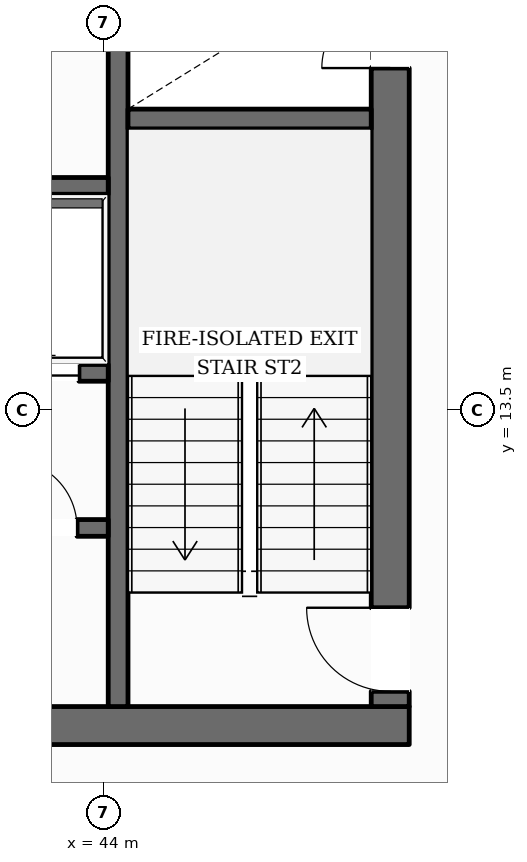
"""IFC4 building model, lengths in metres.
Left out: names, types, materials, properties, quantities, classifications, styles, units other than length and angle.
Written with IfcOpenShell. Run it as: python <this file> out.ifc"""

import sys

from ifc_helpers import new_model, si_unit, direction, frame, frame_2d, origin, place, context, subcontext, project, spatial, rectangle, extrude, element, fill, save


model = new_model("IFC4")
c1 = context("Model", 3, precision=1e-05, world=origin(), true_north=direction((0.0, 1.0)))
c2 = subcontext(c1, "Body", "Model", "MODEL_VIEW")
j1 = project(units=[si_unit("LENGTHUNIT", "METRE"), si_unit("PLANEANGLEUNIT", "RADIAN")], contexts=[c1])
p1 = place(None, origin())
s1 = spatial("IfcSite", under=j1, at=p1, CompositionType="ELEMENT")
p2 = place(p1, origin())
s2 = spatial("IfcBuilding", under=s1, at=p2, CompositionType="ELEMENT")
p3 = place(p2, frame((0.0, 0.0, 147.1)))
s3 = spatial("IfcBuildingStorey", under=s2, at=p3, CompositionType="ELEMENT", Elevation=147.1)
p4 = place(p3, frame((27.98, 9.35, 0.0), z_axis=(0.0, 0.0, 1.0), x_axis=(1.0, 0.0, 0.0)))
e1 = element("IfcWall", 1, at=p4, inside=s3, PredefinedType="SOLIDWALL", context=c2, shape_type="SweptSolid", body=[
    extrude(rectangle(XDim=20.04, YDim=0.5, at=frame_2d((10.02, 0.0))), origin(), (0.0, 0.0, 1.0), 3.6),
])
p5 = place(p4, frame((10.52, 0.0, 0.0)))
e2 = element("IfcOpeningElement", 2, at=p5, cuts=e1, PredefinedType="OPENING", context=c2, shape_type="SweptSolid", body=[
    extrude(rectangle(XDim=1.4, YDim=2.2, at=frame_2d((0.7, 1.1))), frame((0.0, 0.26, 0.0), z_axis=(0.0, -1.0, 0.0), x_axis=(1.0, 0.0, 0.0)), (0.0, 0.0, 1.0), 0.52),
])
p6 = place(p3, frame((47.77, 9.6, 0.0), z_axis=(0.0, 0.0, 1.0), x_axis=(0.0, 1.0, 0.0)))
e3 = element("IfcWall", 3, at=p6, inside=s3, PredefinedType="SOLIDWALL", context=c2, shape_type="SweptSolid", body=[
    extrude(rectangle(XDim=13.0, YDim=0.5, at=frame_2d((6.5, 0.0))), origin(), (0.0, 0.0, 1.0), 3.6),
])
p7 = place(p6, frame((0.2, 0.0, 0.0)))
e4 = element("IfcOpeningElement", 4, at=p7, cuts=e3, PredefinedType="OPENING", context=c2, shape_type="SweptSolid", body=[
    extrude(rectangle(XDim=1.1, YDim=2.15, at=frame_2d((0.55, 1.075))), frame((0.0, 0.26, 0.0), z_axis=(0.0, -1.0, 0.0), x_axis=(1.0, 0.0, 0.0)), (0.0, 0.0, 1.0), 0.52),
])
p8 = place(p6, frame((8.4, 0.0, 0.0)))
e5 = element("IfcOpeningElement", 5, at=p8, cuts=e3, PredefinedType="OPENING", context=c2, shape_type="SweptSolid", body=[
    extrude(rectangle(XDim=0.9, YDim=2.1, at=frame_2d((0.45, 1.05))), frame((0.0, 0.26, 0.0), z_axis=(0.0, -1.0, 0.0), x_axis=(1.0, 0.0, 0.0)), (0.0, 0.0, 1.0), 0.52),
])
p9 = place(p3, frame((44.19, 9.6, 0.0), z_axis=(0.0, 0.0, 1.0), x_axis=(0.0, 1.0, 0.0)))
e6 = element("IfcWall", 6, at=p9, inside=s3, PredefinedType="SHEAR", context=c2, shape_type="SweptSolid", body=[
    extrude(rectangle(XDim=13.0, YDim=0.26, at=frame_2d((6.5, 0.0))), origin(), (0.0, 0.0, 1.0), 3.6),
])
p10 = place(p9, frame((10.925, 0.0, 0.0)))
e7 = element("IfcOpeningElement", 7, at=p10, cuts=e6, PredefinedType="OPENING", context=c2, shape_type="SweptSolid", body=[
    extrude(rectangle(XDim=1.25, YDim=2.25, at=frame_2d((0.625, 1.125))), frame((0.0, 0.14, 0.0), z_axis=(0.0, -1.0, 0.0), x_axis=(1.0, 0.0, 0.0)), (0.0, 0.0, 1.0), 0.28),
])
p11 = place(p3, frame((44.32, 17.33, 0.0), z_axis=(0.0, 0.0, 1.0), x_axis=(1.0, 0.0, 0.0)))
e8 = element("IfcWall", 8, at=p11, inside=s3, PredefinedType="SHEAR", context=c2, shape_type="SweptSolid", body=[
    extrude(rectangle(XDim=3.2, YDim=0.26, at=frame_2d((1.6, 0.0))), origin(), (0.0, 0.0, 1.0), 3.6),
])
p12 = place(p3, frame((31.94, 16.45, 0.0), z_axis=(0.0, 0.0, 1.0), x_axis=(1.0, 0.0, 0.0)))
e9 = element("IfcWall", 9, at=p12, inside=s3, PredefinedType="SOLIDWALL", context=c2, shape_type="SweptSolid", body=[
    extrude(rectangle(XDim=12.12, YDim=0.22, at=frame_2d((6.06, 0.0))), origin(), (0.0, 0.0, 1.0), 3.6),
])
p13 = place(p3, frame((31.94, 13.99, 0.0), z_axis=(0.0, 0.0, 1.0), x_axis=(1.0, 0.0, 0.0)))
e10 = element("IfcWall", 10, at=p13, inside=s3, PredefinedType="SOLIDWALL", context=c2, shape_type="SweptSolid", body=[
    extrude(rectangle(XDim=12.12, YDim=0.22, at=frame_2d((6.06, 0.0))), origin(), (0.0, 0.0, 1.0), 3.6),
])
p14 = place(p13, frame((1.21, 0.0, 0.0)))
e11 = element("IfcOpeningElement", 11, at=p14, cuts=e10, PredefinedType="OPENING", context=c2, shape_type="SweptSolid", body=[
    extrude(rectangle(XDim=0.9, YDim=2.1, at=frame_2d((0.45, 1.05))), frame((0.0, 0.12, 0.0), z_axis=(0.0, -1.0, 0.0), x_axis=(1.0, 0.0, 0.0)), (0.0, 0.0, 1.0), 0.24),
])
p15 = place(p13, frame((4.31, 0.0, 0.0)))
e12 = element("IfcOpeningElement", 12, at=p15, cuts=e10, PredefinedType="OPENING", context=c2, shape_type="SweptSolid", body=[
    extrude(rectangle(XDim=0.9, YDim=2.1, at=frame_2d((0.45, 1.05))), frame((0.0, 0.12, 0.0), z_axis=(0.0, -1.0, 0.0), x_axis=(1.0, 0.0, 0.0)), (0.0, 0.0, 1.0), 0.24),
])
p16 = place(p13, frame((6.535, 0.0, 0.0)))
e13 = element("IfcOpeningElement", 13, at=p16, cuts=e10, PredefinedType="OPENING", context=c2, shape_type="SweptSolid", body=[
    extrude(rectangle(XDim=1.1, YDim=2.2, at=frame_2d((0.55, 1.1))), frame((0.0, 0.12, 0.0), z_axis=(0.0, -1.0, 0.0), x_axis=(1.0, 0.0, 0.0)), (0.0, 0.0, 1.0), 0.24),
])
p17 = place(p13, frame((8.585, 0.0, 0.0)))
e14 = element("IfcOpeningElement", 14, at=p17, cuts=e10, PredefinedType="OPENING", context=c2, shape_type="SweptSolid", body=[
    extrude(rectangle(XDim=1.1, YDim=2.2, at=frame_2d((0.55, 1.1))), frame((0.0, 0.12, 0.0), z_axis=(0.0, -1.0, 0.0), x_axis=(1.0, 0.0, 0.0)), (0.0, 0.0, 1.0), 0.24),
])
p18 = place(p13, frame((10.635, 0.0, 0.0)))
e15 = element("IfcOpeningElement", 15, at=p18, cuts=e10, PredefinedType="OPENING", context=c2, shape_type="SweptSolid", body=[
    extrude(rectangle(XDim=1.1, YDim=2.2, at=frame_2d((0.55, 1.1))), frame((0.0, 0.12, 0.0), z_axis=(0.0, -1.0, 0.0), x_axis=(1.0, 0.0, 0.0)), (0.0, 0.0, 1.0), 0.24),
])
p19 = place(p3, frame((40.28, 11.95, 0.0), z_axis=(0.0, 0.0, 1.0), x_axis=(1.0, 0.0, 0.0)))
e16 = element("IfcWall", 16, at=p19, inside=s3, PredefinedType="SOLIDWALL", context=c2, shape_type="SweptSolid", body=[
    extrude(rectangle(XDim=3.78, YDim=0.22, at=frame_2d((1.89, 0.0))), origin(), (0.0, 0.0, 1.0), 3.6),
])
p20 = place(p19, frame((0.62, 0.0, 0.0)))
e17 = element("IfcOpeningElement", 17, at=p20, cuts=e16, PredefinedType="OPENING", context=c2, shape_type="SweptSolid", body=[
    extrude(rectangle(XDim=0.9, YDim=2.1, at=frame_2d((0.45, 1.05))), frame((0.0, 0.12, 0.0), z_axis=(0.0, -1.0, 0.0), x_axis=(1.0, 0.0, 0.0)), (0.0, 0.0, 1.0), 0.24),
])
p21 = place(p19, frame((2.47, 0.0, 0.0)))
e18 = element("IfcOpeningElement", 18, at=p21, cuts=e16, PredefinedType="OPENING", context=c2, shape_type="SweptSolid", body=[
    extrude(rectangle(XDim=0.9, YDim=2.1, at=frame_2d((0.45, 1.05))), frame((0.0, 0.12, 0.0), z_axis=(0.0, -1.0, 0.0), x_axis=(1.0, 0.0, 0.0)), (0.0, 0.0, 1.0), 0.24),
])
p22 = place(p3, frame((43.264, 45.146, 0.0), z_axis=(0.0, 0.0, 1.0), x_axis=(0.496479799544, -0.868048275527, 0.0)))
e19 = element("IfcWall", 19, at=p22, inside=s3, PredefinedType="STANDARD", context=c2, shape_type="SweptSolid", body=[
    extrude(rectangle(XDim=37.869, YDim=0.38, at=frame_2d((18.934, 0.0))), origin(), (0.0, 0.0, 1.0), 3.059),
])
p23 = place(p22, frame((33.541, 0.0, 0.65)))
e20 = element("IfcOpeningElement", 20, at=p23, cuts=e19, PredefinedType="OPENING", context=c2, shape_type="SweptSolid", body=[
    extrude(rectangle(XDim=1.55, YDim=1.75, at=frame_2d((0.775, 0.875))), frame((0.0, 0.2, 0.0), z_axis=(0.0, -1.0, 0.0), x_axis=(1.0, 0.0, 0.0)), (0.0, 0.0, 1.0), 0.4),
])
p24 = place(p22, frame((27.389, 0.0, 0.65)))
e21 = element("IfcOpeningElement", 21, at=p24, cuts=e19, PredefinedType="OPENING", context=c2, shape_type="SweptSolid", body=[
    extrude(rectangle(XDim=1.55, YDim=1.75, at=frame_2d((0.775, 0.875))), frame((0.0, 0.2, 0.0), z_axis=(0.0, -1.0, 0.0), x_axis=(1.0, 0.0, 0.0)), (0.0, 0.0, 1.0), 0.4),
])
p25 = place(p22, frame((15.085, 0.0, 0.65)))
e22 = element("IfcOpeningElement", 22, at=p25, cuts=e19, PredefinedType="OPENING", context=c2, shape_type="SweptSolid", body=[
    extrude(rectangle(XDim=1.55, YDim=1.75, at=frame_2d((0.775, 0.875))), frame((0.0, 0.2, 0.0), z_axis=(0.0, -1.0, 0.0), x_axis=(1.0, 0.0, 0.0)), (0.0, 0.0, 1.0), 0.4),
])
p26 = place(p22, frame((8.934, 0.0, 0.65)))
e23 = element("IfcOpeningElement", 23, at=p26, cuts=e19, PredefinedType="OPENING", context=c2, shape_type="SweptSolid", body=[
    extrude(rectangle(XDim=1.55, YDim=1.75, at=frame_2d((0.775, 0.875))), frame((0.0, 0.2, 0.0), z_axis=(0.0, -1.0, 0.0), x_axis=(1.0, 0.0, 0.0)), (0.0, 0.0, 1.0), 0.4),
])
p27 = place(p22, frame((2.782, 0.0, 0.65)))
e24 = element("IfcOpeningElement", 24, at=p27, cuts=e19, PredefinedType="OPENING", context=c2, shape_type="SweptSolid", body=[
    extrude(rectangle(XDim=1.55, YDim=1.75, at=frame_2d((0.775, 0.875))), frame((0.0, 0.2, 0.0), z_axis=(0.0, -1.0, 0.0), x_axis=(1.0, 0.0, 0.0)), (0.0, 0.0, 1.0), 0.4),
])
p28 = place(p7, origin())
e25 = element("IfcDoor", 25, at=p28, inside=s3, OperationType="SINGLE_SWING_RIGHT", PredefinedType="DOOR", context=c2, shape_type="SweptSolid", body=[
    extrude(rectangle(XDim=1.1, YDim=2.15, at=frame_2d((0.55, 1.075))), frame((0.0, 0.025, 0.0), z_axis=(0.0, -1.0, 0.0), x_axis=(1.0, 0.0, 0.0)), (0.0, 0.0, 1.0), 0.05),
])
fill(e4, e25)
p29 = place(p8, origin())
e26 = element("IfcDoor", 26, at=p29, inside=s3, OperationType="SINGLE_SWING_LEFT", PredefinedType="DOOR", context=c2, shape_type="SweptSolid", body=[
    extrude(rectangle(XDim=0.9, YDim=2.1, at=frame_2d((0.45, 1.05))), frame((0.0, 0.025, 0.0), z_axis=(0.0, -1.0, 0.0), x_axis=(1.0, 0.0, 0.0)), (0.0, 0.0, 1.0), 0.05),
])
fill(e5, e26)
p30 = place(p18, origin())
e27 = element("IfcDoor", 27, at=p30, inside=s3, OperationType="DOUBLE_DOOR_SLIDING", PredefinedType="DOOR", context=c2, shape_type="SweptSolid", body=[
    extrude(rectangle(XDim=1.1, YDim=2.2, at=frame_2d((0.55, 1.1))), frame((0.0, 0.025, 0.0), z_axis=(0.0, -1.0, 0.0), x_axis=(1.0, 0.0, 0.0)), (0.0, 0.0, 1.0), 0.05),
])
fill(e15, e27)
p31 = place(p21, origin())
e28 = element("IfcDoor", 28, at=p31, inside=s3, OperationType="SINGLE_SWING_LEFT", PredefinedType="DOOR", context=c2, shape_type="SweptSolid", body=[
    extrude(rectangle(XDim=0.9, YDim=2.1, at=frame_2d((0.45, 1.05))), frame((0.0, 0.025, 0.0), z_axis=(0.0, -1.0, 0.0), x_axis=(1.0, 0.0, 0.0)), (0.0, 0.0, 1.0), 0.05),
])
fill(e18, e28)
save(model, sys.argv[1])
